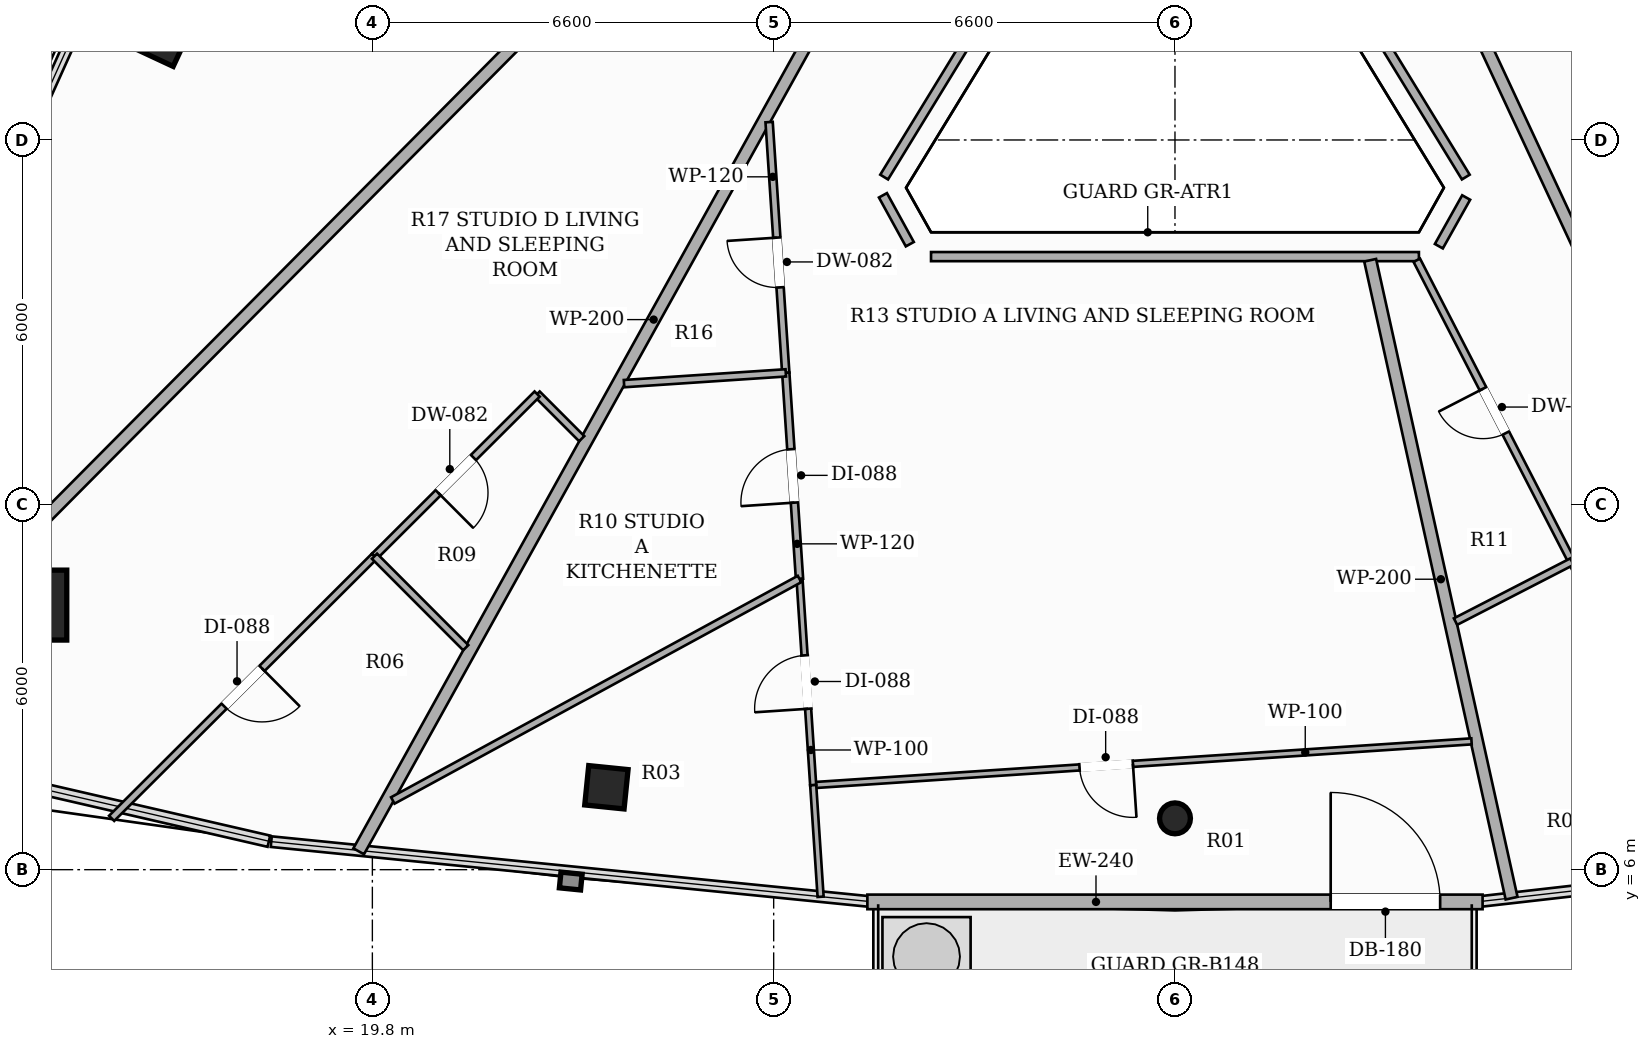
"""IFC4 building model, lengths in metres.
Left out: names, types, materials, properties, quantities, classifications, styles, units other than length and angle.
Written with IfcOpenShell. Run it as: python <this file> out.ifc"""

import sys

from ifc_helpers import new_model, si_unit, direction, frame, frame_2d, origin, origin_2d, place, context, subcontext, project, spatial, rectangle, hollow_rectangle, hollow_circle, extrude, element, fill, save


model = new_model("IFC4")
c1 = context("Model", 3, precision=1e-05, world=origin(), true_north=direction((0.0, 1.0)))
c2 = subcontext(c1, "Body", "Model", "MODEL_VIEW")
j1 = project(units=[si_unit("LENGTHUNIT", "METRE"), si_unit("PLANEANGLEUNIT", "RADIAN")], contexts=[c1])
p1 = place(None, origin())
s1 = spatial("IfcSite", under=j1, at=p1, CompositionType="ELEMENT")
p2 = place(p1, origin())
s2 = spatial("IfcBuilding", under=s1, at=p2, CompositionType="ELEMENT")
p3 = place(p2, frame((0.0, 0.0, 256.85)))
s3 = spatial("IfcBuildingStorey", under=s2, at=p3, CompositionType="ELEMENT", Elevation=256.85)
p4 = place(p3, frame((14.199, 10.351, 0.0), z_axis=(0.0, 0.0, 1.0), x_axis=(1.0, 0.0, 0.0)))
e1 = element("IfcColumn", 1, at=p4, inside=s3, PredefinedType="COLUMN", context=c2, shape_type="SweptSolid", body=[
    extrude(hollow_rectangle(XDim=1.15, YDim=1.15, WallThickness=0.036, at=origin_2d()), origin(), (0.0, 0.0, 1.0), 3.3),
])
for number, where, z_axis, x_axis in (
    (2, (16.367, 19.642, 0.0), (0.0, 0.0, 1.0), (0.423, 0.906, 0.0)),
    (3, (23.649, 7.355, 0.0), (0.0, 0.0, 1.0), (-0.995, 0.101, 0.0)),
):
    element("IfcColumn", number, at=place(p3, frame(where, z_axis=z_axis, x_axis=x_axis)), inside=s3, PredefinedType="COLUMN", context=c2, shape_type="SweptSolid", body=[
        extrude(hollow_rectangle(XDim=0.65, YDim=0.65, WallThickness=0.022, at=origin_2d()), origin(), (0.0, 0.0, 1.0), 3.3),
    ])
p5 = place(p3, frame((33.0, 6.844, 0.0), z_axis=(0.0, 0.0, 1.0), x_axis=(1.0, 0.0, 0.0)))
e4 = element("IfcColumn", 4, at=p5, inside=s3, PredefinedType="COLUMN", context=c2, shape_type="SweptSolid", body=[
    extrude(hollow_circle(Radius=0.254, WallThickness=0.016, at=origin_2d()), origin(), (0.0, 0.0, 1.0), 3.3),
])
p6 = place(p3, frame((27.941, 5.47, 0.0), z_axis=(0.0, 0.0, 1.0), x_axis=(1.0, 0.0, 0.0)))
e5 = element("IfcWall", 5, at=p6, inside=s3, PredefinedType="SOLIDWALL", context=c2, shape_type="SweptSolid", body=[
    extrude(rectangle(XDim=10.118, YDim=0.24, at=frame_2d((5.059, 0.0))), origin(), (0.0, 0.0, 1.0), 2.624),
])
p7 = place(p6, frame((7.62, 0.0, 0.0)))
e6 = element("IfcOpeningElement", 6, at=p7, cuts=e5, PredefinedType="OPENING", context=c2, shape_type="SweptSolid", body=[
    extrude(rectangle(XDim=1.8, YDim=2.2, at=frame_2d((0.9, 1.1))), frame((0.0, 0.13, 0.0), z_axis=(0.0, -1.0, 0.0), x_axis=(1.0, 0.0, 0.0)), (0.0, 0.0, 1.0), 0.26),
])
p8 = place(p3, frame((33.866, 23.79, 0.0), z_axis=(0.0, 0.0, 1.0), x_axis=(0.522011859837, -0.852938226479, 0.0)))
e7 = element("IfcWall", 7, at=p8, inside=s3, PredefinedType="PARTITIONING", context=c2, shape_type="SweptSolid", body=[
    extrude(rectangle(XDim=7.504, YDim=0.15, at=frame_2d((3.752, 0.0))), origin(), (0.0, 0.0, 1.0), 2.773),
])
p9 = place(p3, frame((37.789, 17.054, 0.0), z_axis=(0.0, 0.0, 1.0), x_axis=(-0.488935266506, -0.872320070368, 0.0)))
e8 = element("IfcWall", 8, at=p9, inside=s3, PredefinedType="PARTITIONING", context=c2, shape_type="SweptSolid", body=[
    extrude(rectangle(XDim=0.918, YDim=0.15, at=frame_2d((0.459, 0.0))), origin(), (0.0, 0.0, 1.0), 3.06),
])
p10 = place(p3, frame((37.012, 16.082, 0.0), z_axis=(0.0, 0.0, 1.0), x_axis=(-1.0, 0.0, 0.0)))
e9 = element("IfcWall", 9, at=p10, inside=s3, PredefinedType="PARTITIONING", context=c2, shape_type="SweptSolid", body=[
    extrude(rectangle(XDim=8.024, YDim=0.15, at=frame_2d((4.012, 0.0))), origin(), (0.0, 0.0, 1.0), 2.773),
])
p11 = place(p3, frame((28.639, 16.286, 0.0), z_axis=(0.0, 0.0, 1.0), x_axis=(-0.481571453054, 0.876406832244, 0.0)))
e10 = element("IfcWall", 10, at=p11, inside=s3, PredefinedType="PARTITIONING", context=c2, shape_type="SweptSolid", body=[
    extrude(rectangle(XDim=0.918, YDim=0.15, at=frame_2d((0.459, 0.0))), origin(), (0.0, 0.0, 1.0), 3.06),
])
p12 = place(p3, frame((28.217, 17.39, 0.0), z_axis=(0.0, 0.0, 1.0), x_axis=(0.522011859837, 0.852938226479, 0.0)))
e11 = element("IfcWall", 11, at=p12, inside=s3, PredefinedType="PARTITIONING", context=c2, shape_type="SweptSolid", body=[
    extrude(rectangle(XDim=7.504, YDim=0.15, at=frame_2d((3.752, 0.0))), origin(), (0.0, 0.0, 1.0), 2.773),
])
p13 = place(p3, frame((19.575, 6.302, 0.0), z_axis=(0.0, 0.0, 1.0), x_axis=(0.485129783088, 0.874442161358, 0.0)))
e12 = element("IfcWall", 12, at=p13, inside=s3, PredefinedType="PARTITIONING", context=c2, shape_type="SweptSolid", body=[
    extrude(rectangle(XDim=19.999, YDim=0.2, at=frame_2d((10.0, 0.0))), origin(), (0.0, 0.0, 1.0), 2.492),
])
p14 = place(p3, frame((36.21, 16.022, 0.0), z_axis=(0.0, 0.0, 1.0), x_axis=(0.216451711791, -0.976293325012, 0.0)))
e13 = element("IfcWall", 13, at=p14, inside=s3, PredefinedType="PARTITIONING", context=c2, shape_type="SweptSolid", body=[
    extrude(rectangle(XDim=10.746, YDim=0.2, at=frame_2d((5.373, 0.0))), origin(), (0.0, 0.0, 1.0), 2.492),
])
p15 = place(p3, frame((26.338, 23.79, 0.0), z_axis=(0.0, 0.0, 1.0), x_axis=(-0.70454576136, -0.70965855885, 0.0)))
e14 = element("IfcWall", 14, at=p15, inside=s3, PredefinedType="PARTITIONING", context=c2, shape_type="SweptSolid", body=[
    extrude(rectangle(XDim=21.536, YDim=0.2, at=frame_2d((10.768, 0.0))), origin(), (0.0, 0.0, 1.0), 2.492),
])
p16 = place(p3, frame((44.391, 6.058, 0.0), z_axis=(0.0, 0.0, 1.0), x_axis=(-0.422434507673, 0.906393450289, 0.0)))
e15 = element("IfcWall", 15, at=p16, inside=s3, PredefinedType="PARTITIONING", context=c2, shape_type="SweptSolid", body=[
    extrude(rectangle(XDim=19.563, YDim=0.2, at=frame_2d((9.782, 0.0))), origin(), (0.0, 0.0, 1.0), 2.492),
])
p17 = place(p3, frame((26.599, 14.17, 0.0), z_axis=(0.0, 0.0, 1.0), x_axis=(-0.066334744758, 0.997797425151, 0.0)))
e16 = element("IfcWall", 16, at=p17, inside=s3, PredefinedType="PARTITIONING", context=c2, shape_type="SweptSolid", body=[
    extrude(rectangle(XDim=4.133, YDim=0.12, at=frame_2d((2.066, 0.0))), origin(), (0.0, 0.0, 1.0), 2.773),
])
p18 = place(p17, frame((1.409, 0.0, 0.0)))
e17 = element("IfcOpeningElement", 17, at=p18, cuts=e16, PredefinedType="OPENING", context=c2, shape_type="SweptSolid", body=[
    extrude(rectangle(XDim=0.82, YDim=2.1, at=frame_2d((0.41, 1.05))), frame((0.0, 0.07, 0.0), z_axis=(0.0, -1.0, 0.0), x_axis=(1.0, 0.0, 0.0)), (0.0, 0.0, 1.0), 0.14),
])
p19 = place(p3, frame((26.825, 10.78, 0.0), z_axis=(0.0, 0.0, 1.0), x_axis=(-0.066471315173, 0.997788336402, 0.0)))
e18 = element("IfcWall", 18, at=p19, inside=s3, PredefinedType="PARTITIONING", context=c2, shape_type="SweptSolid", body=[
    extrude(rectangle(XDim=3.397, YDim=0.12, at=frame_2d((1.699, 0.0))), origin(), (0.0, 0.0, 1.0), 3.06),
])
p20 = place(p19, frame((1.259, 0.0, 0.0)))
e19 = element("IfcOpeningElement", 19, at=p20, cuts=e18, PredefinedType="OPENING", context=c2, shape_type="SweptSolid", body=[
    extrude(rectangle(XDim=0.88, YDim=2.1, at=frame_2d((0.44, 1.05))), frame((0.0, 0.07, 0.0), z_axis=(0.0, -1.0, 0.0), x_axis=(1.0, 0.0, 0.0)), (0.0, 0.0, 1.0), 0.14),
])
p21 = place(p3, frame((37.877, 8.11, 0.0), z_axis=(0.0, 0.0, 1.0), x_axis=(-0.997794804299, -0.066374155471, 0.0)))
e20 = element("IfcWall", 20, at=p21, inside=s3, PredefinedType="PARTITIONING", context=c2, shape_type="SweptSolid", body=[
    extrude(rectangle(XDim=10.851, YDim=0.1, at=frame_2d((5.425, 0.0))), origin(), (0.0, 0.0, 1.0), 2.492),
])
p22 = place(p21, frame((5.581, 0.0, 0.0)))
e21 = element("IfcOpeningElement", 21, at=p22, cuts=e20, PredefinedType="OPENING", context=c2, shape_type="SweptSolid", body=[
    extrude(rectangle(XDim=0.88, YDim=2.1, at=frame_2d((0.44, 1.05))), frame((0.0, 0.06, 0.0), z_axis=(0.0, -1.0, 0.0), x_axis=(1.0, 0.0, 0.0)), (0.0, 0.0, 1.0), 0.12),
])
p23 = place(p3, frame((27.05, 7.39, 0.0), z_axis=(0.0, 0.0, 1.0), x_axis=(-0.066251929929, 0.997802927326, 0.0)))
e22 = element("IfcWall", 22, at=p23, inside=s3, PredefinedType="PARTITIONING", context=c2, shape_type="SweptSolid", body=[
    extrude(rectangle(XDim=3.398, YDim=0.1, at=frame_2d((1.699, 0.0))), origin(), (0.0, 0.0, 1.0), 2.492),
])
p24 = place(p23, frame((1.259, 0.0, 0.0)))
e23 = element("IfcOpeningElement", 23, at=p24, cuts=e22, PredefinedType="OPENING", context=c2, shape_type="SweptSolid", body=[
    extrude(rectangle(XDim=0.88, YDim=2.1, at=frame_2d((0.44, 1.05))), frame((0.0, 0.06, 0.0), z_axis=(0.0, -1.0, 0.0), x_axis=(1.0, 0.0, 0.0)), (0.0, 0.0, 1.0), 0.12),
])
p25 = place(p3, frame((26.599, 14.17, 0.0), z_axis=(0.0, 0.0, 1.0), x_axis=(-0.99779365881, -0.066391373223, 0.0)))
e24 = element("IfcWall", 24, at=p25, inside=s3, PredefinedType="PARTITIONING", context=c2, shape_type="SweptSolid", body=[
    extrude(rectangle(XDim=2.666, YDim=0.12, at=frame_2d((1.333, 0.0))), origin(), (0.0, 0.0, 1.0), 2.773),
])
p26 = place(p3, frame((26.825, 10.78, 0.0), z_axis=(0.0, 0.0, 1.0), x_axis=(-0.87825059366, -0.478200684583, 0.0)))
e25 = element("IfcWall", 25, at=p26, inside=s3, PredefinedType="PARTITIONING", context=c2, shape_type="SweptSolid", body=[
    extrude(rectangle(XDim=7.616, YDim=0.12, at=frame_2d((3.808, 0.0))), origin(), (0.0, 0.0, 1.0), 2.492),
])
p27 = place(p3, frame((27.172, 5.554, 0.0), z_axis=(0.0, 0.0, 1.0), x_axis=(-0.066342877953, 0.997796884413, 0.0)))
e26 = element("IfcWall", 26, at=p27, inside=s3, PredefinedType="PARTITIONING", context=c2, shape_type="SweptSolid", body=[
    extrude(rectangle(XDim=1.84, YDim=0.1, at=frame_2d((0.92, 0.0))), origin(), (0.0, 0.0, 1.0), 2.492),
])
p28 = place(p3, frame((23.243, 13.088, 0.0), z_axis=(0.0, 0.0, 1.0), x_axis=(-0.706518163511, 0.707694909286, 0.0)))
e27 = element("IfcWall", 27, at=p28, inside=s3, PredefinedType="PARTITIONING", context=c2, shape_type="SweptSolid", body=[
    extrude(rectangle(XDim=1.037, YDim=0.12, at=frame_2d((0.519, 0.0))), origin(), (0.0, 0.0, 1.0), 3.06),
])
p29 = place(p3, frame((22.51, 13.822, 0.0), z_axis=(0.0, 0.0, 1.0), x_axis=(-0.708172404385, -0.706039549649, 0.0)))
e28 = element("IfcWall", 28, at=p29, inside=s3, PredefinedType="PARTITIONING", context=c2, shape_type="SweptSolid", body=[
    extrude(rectangle(XDim=3.777, YDim=0.12, at=frame_2d((1.889, 0.0))), origin(), (0.0, 0.0, 1.0), 2.773),
])
p30 = place(p29, frame((1.479, 0.0, 0.0)))
e29 = element("IfcOpeningElement", 29, at=p30, cuts=e28, PredefinedType="OPENING", context=c2, shape_type="SweptSolid", body=[
    extrude(rectangle(XDim=0.82, YDim=2.1, at=frame_2d((0.41, 1.05))), frame((0.0, 0.07, 0.0), z_axis=(0.0, -1.0, 0.0), x_axis=(1.0, 0.0, 0.0)), (0.0, 0.0, 1.0), 0.14),
])
p31 = place(p3, frame((19.835, 11.155, 0.0), z_axis=(0.0, 0.0, 1.0), x_axis=(-0.708085833798, -0.706126371108, 0.0)))
e30 = element("IfcWall", 30, at=p31, inside=s3, PredefinedType="PARTITIONING", context=c2, shape_type="SweptSolid", body=[
    extrude(rectangle(XDim=6.105, YDim=0.12, at=frame_2d((3.053, 0.0))), origin(), (0.0, 0.0, 1.0), 2.492),
])
p32 = place(p31, frame((2.613, 0.0, 0.0)))
e31 = element("IfcOpeningElement", 31, at=p32, cuts=e30, PredefinedType="OPENING", context=c2, shape_type="SweptSolid", body=[
    extrude(rectangle(XDim=0.88, YDim=2.1, at=frame_2d((0.44, 1.05))), frame((0.0, 0.07, 0.0), z_axis=(0.0, -1.0, 0.0), x_axis=(1.0, 0.0, 0.0)), (0.0, 0.0, 1.0), 0.14),
])
p33 = place(p3, frame((21.336, 9.651, 0.0), z_axis=(0.0, 0.0, 1.0), x_axis=(-0.70635958505, 0.707853188597, 0.0)))
e32 = element("IfcWall", 32, at=p33, inside=s3, PredefinedType="PARTITIONING", context=c2, shape_type="SweptSolid", body=[
    extrude(rectangle(XDim=2.125, YDim=0.12, at=frame_2d((1.062, 0.0))), origin(), (0.0, 0.0, 1.0), 2.773),
])
p34 = place(p3, frame((39.529, 11.066, 0.0), z_axis=(0.0, 0.0, 1.0), x_axis=(-0.457798211716, 0.889056127221, 0.0)))
e33 = element("IfcWall", 33, at=p34, inside=s3, PredefinedType="PARTITIONING", context=c2, shape_type="SweptSolid", body=[
    extrude(rectangle(XDim=5.574, YDim=0.12, at=frame_2d((2.787, 0.0))), origin(), (0.0, 0.0, 1.0), 2.773),
])
p35 = place(p34, frame((2.377, 0.0, 0.0)))
e34 = element("IfcOpeningElement", 34, at=p35, cuts=e33, PredefinedType="OPENING", context=c2, shape_type="SweptSolid", body=[
    extrude(rectangle(XDim=0.82, YDim=2.1, at=frame_2d((0.41, 1.05))), frame((0.0, 0.07, 0.0), z_axis=(0.0, -1.0, 0.0), x_axis=(1.0, 0.0, 0.0)), (0.0, 0.0, 1.0), 0.14),
])
p36 = place(p3, frame((42.228, 5.826, 0.0), z_axis=(0.0, 0.0, 1.0), x_axis=(-0.457901041138, 0.889003170143, 0.0)))
e35 = element("IfcWall", 35, at=p36, inside=s3, PredefinedType="PARTITIONING", context=c2, shape_type="SweptSolid", body=[
    extrude(rectangle(XDim=5.894, YDim=0.12, at=frame_2d((2.947, 0.0))), origin(), (0.0, 0.0, 1.0), 2.492),
])
p37 = place(p36, frame((2.507, 0.0, 0.0)))
e36 = element("IfcOpeningElement", 36, at=p37, cuts=e35, PredefinedType="OPENING", context=c2, shape_type="SweptSolid", body=[
    extrude(rectangle(XDim=0.88, YDim=2.1, at=frame_2d((0.44, 1.05))), frame((0.0, 0.07, 0.0), z_axis=(0.0, -1.0, 0.0), x_axis=(1.0, 0.0, 0.0)), (0.0, 0.0, 1.0), 0.14),
])
p38 = place(p3, frame((39.529, 11.066, 0.0), z_axis=(0.0, 0.0, 1.0), x_axis=(-0.889105964634, -0.457701413207, 0.0)))
e37 = element("IfcWall", 37, at=p38, inside=s3, PredefinedType="PARTITIONING", context=c2, shape_type="SweptSolid", body=[
    extrude(rectangle(XDim=2.154, YDim=0.12, at=frame_2d((1.077, 0.0))), origin(), (0.0, 0.0, 1.0), 2.773),
])
p39 = place(p7, origin())
e38 = element("IfcDoor", 38, at=p39, inside=s3, OperationType="SINGLE_SWING_LEFT", PredefinedType="DOOR", context=c2, shape_type="SweptSolid", body=[
    extrude(rectangle(XDim=1.8, YDim=2.2, at=frame_2d((0.9, 1.1))), frame((0.0, 0.025, 0.0), z_axis=(0.0, -1.0, 0.0), x_axis=(1.0, 0.0, 0.0)), (0.0, 0.0, 1.0), 0.05),
])
fill(e6, e38)
p40 = place(p18, origin())
e39 = element("IfcDoor", 39, at=p40, inside=s3, OperationType="SINGLE_SWING_RIGHT", PredefinedType="DOOR", context=c2, shape_type="SweptSolid", body=[
    extrude(rectangle(XDim=0.82, YDim=2.1, at=frame_2d((0.41, 1.05))), frame((0.0, 0.025, 0.0), z_axis=(0.0, -1.0, 0.0), x_axis=(1.0, 0.0, 0.0)), (0.0, 0.0, 1.0), 0.05),
])
fill(e17, e39)
p41 = place(p20, origin())
e40 = element("IfcDoor", 40, at=p41, inside=s3, OperationType="SINGLE_SWING_LEFT", PredefinedType="DOOR", context=c2, shape_type="SweptSolid", body=[
    extrude(rectangle(XDim=0.88, YDim=2.1, at=frame_2d((0.44, 1.05))), frame((0.0, 0.025, 0.0), z_axis=(0.0, -1.0, 0.0), x_axis=(1.0, 0.0, 0.0)), (0.0, 0.0, 1.0), 0.05),
])
fill(e19, e40)
p42 = place(p22, origin())
e41 = element("IfcDoor", 41, at=p42, inside=s3, OperationType="SINGLE_SWING_LEFT", PredefinedType="DOOR", context=c2, shape_type="SweptSolid", body=[
    extrude(rectangle(XDim=0.88, YDim=2.1, at=frame_2d((0.44, 1.05))), frame((0.0, 0.025, 0.0), z_axis=(0.0, -1.0, 0.0), x_axis=(1.0, 0.0, 0.0)), (0.0, 0.0, 1.0), 0.05),
])
fill(e21, e41)
p43 = place(p24, origin())
e42 = element("IfcDoor", 42, at=p43, inside=s3, OperationType="SINGLE_SWING_LEFT", PredefinedType="DOOR", context=c2, shape_type="SweptSolid", body=[
    extrude(rectangle(XDim=0.88, YDim=2.1, at=frame_2d((0.44, 1.05))), frame((0.0, 0.025, 0.0), z_axis=(0.0, -1.0, 0.0), x_axis=(1.0, 0.0, 0.0)), (0.0, 0.0, 1.0), 0.05),
])
fill(e23, e42)
p44 = place(p30, origin())
e43 = element("IfcDoor", 43, at=p44, inside=s3, OperationType="SINGLE_SWING_RIGHT", PredefinedType="DOOR", context=c2, shape_type="SweptSolid", body=[
    extrude(rectangle(XDim=0.82, YDim=2.1, at=frame_2d((0.41, 1.05))), frame((0.0, 0.025, 0.0), z_axis=(0.0, -1.0, 0.0), x_axis=(1.0, 0.0, 0.0)), (0.0, 0.0, 1.0), 0.05),
])
fill(e29, e43)
p45 = place(p32, origin())
e44 = element("IfcDoor", 44, at=p45, inside=s3, OperationType="SINGLE_SWING_LEFT", PredefinedType="DOOR", context=c2, shape_type="SweptSolid", body=[
    extrude(rectangle(XDim=0.88, YDim=2.1, at=frame_2d((0.44, 1.05))), frame((0.0, 0.025, 0.0), z_axis=(0.0, -1.0, 0.0), x_axis=(1.0, 0.0, 0.0)), (0.0, 0.0, 1.0), 0.05),
])
fill(e31, e44)
p46 = place(p35, origin())
e45 = element("IfcDoor", 45, at=p46, inside=s3, OperationType="SINGLE_SWING_RIGHT", PredefinedType="DOOR", context=c2, shape_type="SweptSolid", body=[
    extrude(rectangle(XDim=0.82, YDim=2.1, at=frame_2d((0.41, 1.05))), frame((0.0, 0.025, 0.0), z_axis=(0.0, -1.0, 0.0), x_axis=(1.0, 0.0, 0.0)), (0.0, 0.0, 1.0), 0.05),
])
fill(e34, e45)
save(model, sys.argv[1])
